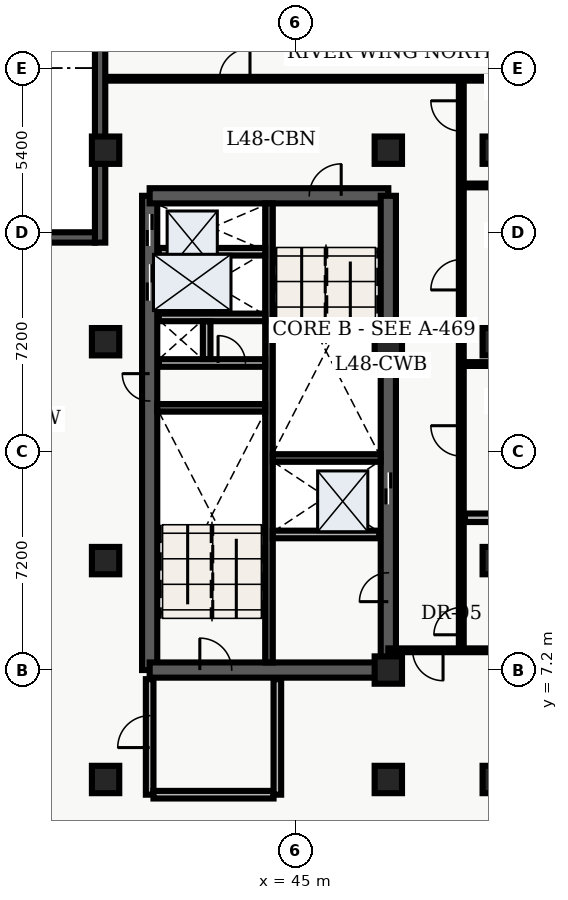
"""IFC4 building model, lengths in metres.
Left out: names, types, materials, properties, quantities, classifications, styles, units other than length and angle.
Written with IfcOpenShell. Run it as: python <this file> out.ifc"""

import sys

from ifc_helpers import new_model, entity, si_unit, converted_unit, direction, frame, origin_with_axes, origin_2d_with_axis, place, context, subcontext, project, spatial, polyline, rectangle, outline, extrude, element, fill, save


model = new_model("IFC4")
c1 = context("Model", 3, precision=1e-05, world=origin_with_axes(), true_north=direction((0.0, 1.0)))
c2 = subcontext(c1, "Body", "Model", "MODEL_VIEW")
j1 = project(units=[si_unit("LENGTHUNIT", "METRE"), converted_unit("PLANEANGLEUNIT", "DEGREE", entity("IfcPlaneAngleMeasure", 0.017), si_unit("PLANEANGLEUNIT", "RADIAN"), dimensions=[0, 0, 0, 0, 0, 0, 0])], contexts=[c1])
p1 = place(None, origin_with_axes())
s1 = spatial("IfcSite", under=j1, at=p1, CompositionType="ELEMENT")
p2 = place(p1, origin_with_axes())
s2 = spatial("IfcBuilding", under=s1, at=p2, CompositionType="ELEMENT")
p3 = place(p2, frame((0.0, 0.0, 196.5), z_axis=(0.0, 0.0, 1.0), x_axis=(1.0, 0.0, 0.0)))
s3 = spatial("IfcBuildingStorey", under=s2, at=p3, CompositionType="ELEMENT", Elevation=196.5)
p4 = place(p3, frame((40.2, 7.2, 0.0), z_axis=(0.0, 0.0, 1.0), x_axis=(0.0, 1.0, 0.0)))
e1 = element("IfcWall", 1, at=p4, inside=s3, PredefinedType="SHEAR", context=c2, shape_type="SweptSolid", body=[
    extrude(outline(polyline([(0.0, -0.25), (15.6, -0.25), (15.6, 0.25), (0.0, 0.25), (0.0, -0.25)])), origin_with_axes(), (0.0, 0.0, 1.0), 3.66),
])
p5 = place(p4, frame((14.475, 0.0, 0.0), z_axis=(0.0, 0.0, 1.0), x_axis=(1.0, 0.0, 0.0)))
e2 = element("IfcOpeningElement", 2, at=p5, cuts=e1, PredefinedType="OPENING", context=c2, shape_type="SweptSolid", body=[
    extrude(rectangle(XDim=1.05, YDim=0.52, at=origin_2d_with_axis()), origin_with_axes(), (0.0, 0.0, 1.0), 2.15),
])
p6 = place(p4, frame((12.75, 0.0, 0.0), z_axis=(0.0, 0.0, 1.0), x_axis=(1.0, 0.0, 0.0)))
e3 = element("IfcOpeningElement", 3, at=p6, cuts=e1, PredefinedType="OPENING", context=c2, shape_type="SweptSolid", body=[
    extrude(rectangle(XDim=1.2, YDim=0.52, at=origin_2d_with_axis()), origin_with_axes(), (0.0, 0.0, 1.0), 2.15),
])
p7 = place(p4, frame((9.3, 0.0, 0.0), z_axis=(0.0, 0.0, 1.0), x_axis=(1.0, 0.0, 0.0)))
e4 = element("IfcOpeningElement", 4, at=p7, cuts=e1, PredefinedType="OPENING", context=c2, shape_type="SweptSolid", body=[
    extrude(rectangle(XDim=0.9, YDim=0.52, at=origin_2d_with_axis()), origin_with_axes(), (0.0, 0.0, 1.0), 2.15),
])
p8 = place(p3, frame((40.2, 7.2, 0.0), z_axis=(0.0, 0.0, 1.0), x_axis=(1.0, 0.0, 0.0)))
e5 = element("IfcWall", 5, at=p8, inside=s3, PredefinedType="SHEAR", context=c2, shape_type="SweptSolid", body=[
    extrude(outline(polyline([(0.0, -0.25), (7.85, -0.25), (7.85, 0.25), (0.0, 0.25), (0.0, -0.25)])), origin_with_axes(), (0.0, 0.0, 1.0), 3.66),
])
p9 = place(p8, frame((2.175, 0.0, 0.0), z_axis=(0.0, 0.0, 1.0), x_axis=(1.0, 0.0, 0.0)))
e6 = element("IfcOpeningElement", 6, at=p9, cuts=e5, PredefinedType="OPENING", context=c2, shape_type="SweptSolid", body=[
    extrude(rectangle(XDim=1.05, YDim=0.52, at=origin_2d_with_axis()), origin_with_axes(), (0.0, 0.0, 1.0), 2.15),
])
p10 = place(p3, frame((40.2, 22.8, 0.0), z_axis=(0.0, 0.0, 1.0), x_axis=(1.0, 0.0, 0.0)))
e7 = element("IfcWall", 7, at=p10, inside=s3, PredefinedType="SHEAR", context=c2, shape_type="SweptSolid", body=[
    extrude(outline(polyline([(0.0, -0.25), (7.85, -0.25), (7.85, 0.25), (0.0, 0.25), (0.0, -0.25)])), origin_with_axes(), (0.0, 0.0, 1.0), 3.66),
])
p11 = place(p10, frame((5.775, 0.0, 0.0), z_axis=(0.0, 0.0, 1.0), x_axis=(1.0, 0.0, 0.0)))
e8 = element("IfcOpeningElement", 8, at=p11, cuts=e7, PredefinedType="OPENING", context=c2, shape_type="SweptSolid", body=[
    extrude(rectangle(XDim=1.05, YDim=0.52, at=origin_2d_with_axis()), origin_with_axes(), (0.0, 0.0, 1.0), 2.15),
])
p12 = place(p3, frame((48.05, 7.2, 0.0), z_axis=(0.0, 0.0, 1.0), x_axis=(0.0, 1.0, 0.0)))
e9 = element("IfcWall", 9, at=p12, inside=s3, PredefinedType="SHEAR", context=c2, shape_type="SweptSolid", body=[
    extrude(outline(polyline([(0.0, -0.25), (15.6, -0.25), (15.6, 0.25), (0.0, 0.25), (0.0, -0.25)])), origin_with_axes(), (0.0, 0.0, 1.0), 3.66),
])
p13 = place(p12, frame((5.975, 0.0, 0.0), z_axis=(0.0, 0.0, 1.0), x_axis=(1.0, 0.0, 0.0)))
e10 = element("IfcOpeningElement", 10, at=p13, cuts=e9, PredefinedType="OPENING", context=c2, shape_type="SweptSolid", body=[
    extrude(rectangle(XDim=1.05, YDim=0.52, at=origin_2d_with_axis()), origin_with_axes(), (0.0, 0.0, 1.0), 2.15),
])
p14 = place(p12, frame((2.725, 0.0, 0.0), z_axis=(0.0, 0.0, 1.0), x_axis=(1.0, 0.0, 0.0)))
e11 = element("IfcOpeningElement", 11, at=p14, cuts=e9, PredefinedType="OPENING", context=c2, shape_type="SweptSolid", body=[
    extrude(rectangle(XDim=0.95, YDim=0.52, at=origin_2d_with_axis()), origin_with_axes(), (0.0, 0.0, 1.0), 2.15),
])
p15 = place(p3, frame((44.125, 7.45, 0.0), z_axis=(0.0, 0.0, 1.0), x_axis=(0.0, 1.0, 0.0)))
e12 = element("IfcWall", 12, at=p15, inside=s3, PredefinedType="SHEAR", context=c2, shape_type="SweptSolid", body=[
    extrude(outline(polyline([(0.0, -0.125), (15.1, -0.125), (15.1, 0.125), (0.0, 0.125), (0.0, -0.125)])), origin_with_axes(), (0.0, 0.0, 1.0), 3.66),
])
for number, where, z_axis, x_axis in (
    (13, (40.45, 15.825, 0.0), (0.0, 0.0, 1.0), (1.0, 0.0, 0.0)),
    (14, (44.25, 14.175, 0.0), (0.0, 0.0, 1.0), (1.0, 0.0, 0.0)),
):
    element("IfcWall", number, at=place(p3, frame(where, z_axis=z_axis, x_axis=x_axis)), inside=s3, PredefinedType="SHEAR", context=c2, shape_type="SweptSolid", body=[
        extrude(outline(polyline([(0.0, -0.125), (3.55, -0.125), (3.55, 0.125), (0.0, 0.125), (0.0, -0.125)])), origin_with_axes(), (0.0, 0.0, 1.0), 3.66),
    ])
p16 = place(p3, frame((40.5, 17.3, 0.0), z_axis=(0.0, 0.0, 1.0), x_axis=(1.0, 0.0, 0.0)))
e15 = element("IfcWall", 15, at=p16, inside=s3, PredefinedType="SOLIDWALL", context=c2, shape_type="SweptSolid", body=[
    extrude(outline(polyline([(0.0, -0.125), (3.5, -0.125), (3.5, 0.125), (0.0, 0.125), (0.0, -0.125)])), origin_with_axes(), (0.0, 0.0, 1.0), 2.7),
])
p17 = place(p16, frame((2.4, 0.0, 0.0), z_axis=(0.0, 0.0, 1.0), x_axis=(1.0, 0.0, 0.0)))
e16 = element("IfcOpeningElement", 16, at=p17, cuts=e15, PredefinedType="OPENING", context=c2, shape_type="SweptSolid", body=[
    extrude(rectangle(XDim=0.9, YDim=0.27, at=origin_2d_with_axis()), origin_with_axes(), (0.0, 0.0, 1.0), 2.15),
])
p18 = place(p3, frame((40.5, 18.8, 0.0), z_axis=(0.0, 0.0, 1.0), x_axis=(1.0, 0.0, 0.0)))
e17 = element("IfcWall", 17, at=p18, inside=s3, PredefinedType="SOLIDWALL", context=c2, shape_type="SweptSolid", body=[
    extrude(outline(polyline([(0.0, -0.125), (3.5, -0.125), (3.5, 0.125), (0.0, 0.125), (0.0, -0.125)])), origin_with_axes(), (0.0, 0.0, 1.0), 2.7),
])
p19 = place(p3, frame((42.075, 17.43, 0.0), z_axis=(0.0, 0.0, 1.0), x_axis=(0.0, 1.0, 0.0)))
e18 = element("IfcWall", 18, at=p19, inside=s3, PredefinedType="SOLIDWALL", context=c2, shape_type="SweptSolid", body=[
    extrude(outline(polyline([(0.0, -0.125), (1.24, -0.125), (1.24, 0.125), (0.0, 0.125), (0.0, -0.125)])), origin_with_axes(), (0.0, 0.0, 1.0), 2.7),
])
p20 = place(p3, frame((40.2, 3.1, 0.0), z_axis=(0.0, 0.0, 1.0), x_axis=(0.0, 1.0, 0.0)))
e19 = element("IfcWall", 19, at=p20, inside=s3, PredefinedType="SOLIDWALL", context=c2, shape_type="SweptSolid", body=[
    extrude(outline(polyline([(0.0, -0.125), (3.8, -0.125), (3.8, 0.125), (0.0, 0.125), (0.0, -0.125)])), origin_with_axes(), (0.0, 0.0, 1.0), 2.7),
])
p21 = place(p20, frame((2.075, 0.0, 0.0), z_axis=(0.0, 0.0, 1.0), x_axis=(1.0, 0.0, 0.0)))
e20 = element("IfcOpeningElement", 20, at=p21, cuts=e19, PredefinedType="OPENING", context=c2, shape_type="SweptSolid", body=[
    extrude(rectangle(XDim=1.05, YDim=0.27, at=origin_2d_with_axis()), origin_with_axes(), (0.0, 0.0, 1.0), 2.15),
])
p22 = place(p3, frame((40.325, 3.1, 0.0), z_axis=(0.0, 0.0, 1.0), x_axis=(1.0, 0.0, 0.0)))
e21 = element("IfcWall", 21, at=p22, inside=s3, PredefinedType="SOLIDWALL", context=c2, shape_type="SweptSolid", body=[
    extrude(outline(polyline([(0.0, -0.125), (3.95, -0.125), (3.95, 0.125), (0.0, 0.125), (0.0, -0.125)])), origin_with_axes(), (0.0, 0.0, 1.0), 2.7),
])
p23 = place(p3, frame((44.4, 3.1, 0.0), z_axis=(0.0, 0.0, 1.0), x_axis=(0.0, 1.0, 0.0)))
e22 = element("IfcWall", 22, at=p23, inside=s3, PredefinedType="SOLIDWALL", context=c2, shape_type="SweptSolid", body=[
    extrude(outline(polyline([(0.0, -0.125), (3.8, -0.125), (3.8, 0.125), (0.0, 0.125), (0.0, -0.125)])), origin_with_axes(), (0.0, 0.0, 1.0), 2.7),
])
for number, where, z_axis, x_axis in (
    (23, (38.75, 3.6, 0.0), (0.0, 0.0, 1.0), (1.0, 0.0, 0.0)),
    (24, (38.75, 10.8, 0.0), (0.0, 0.0, 1.0), (1.0, 0.0, 0.0)),
    (25, (38.75, 18.0, 0.0), (0.0, 0.0, 1.0), (1.0, 0.0, 0.0)),
    (26, (38.75, 24.3, 0.0), (0.0, 0.0, 1.0), (1.0, 0.0, 0.0)),
    (27, (48.05, 3.6, 0.0), (0.0, 0.0, 1.0), (1.0, 0.0, 0.0)),
    (28, (48.05, 7.2, 0.0), (0.0, 0.0, 1.0), (1.0, 0.0, 0.0)),
    (29, (48.05, 18.0, 0.0), (0.0, 0.0, 1.0), (1.0, 0.0, 0.0)),
    (30, (48.05, 24.3, 0.0), (0.0, 0.0, 1.0), (1.0, 0.0, 0.0)),
    (31, (51.6, 3.6, 0.0), (0.0, 0.0, 1.0), (1.0, 0.0, 0.0)),
    (32, (51.6, 10.8, 0.0), (0.0, 0.0, 1.0), (1.0, 0.0, 0.0)),
    (33, (51.6, 18.0, 0.0), (0.0, 0.0, 1.0), (1.0, 0.0, 0.0)),
    (34, (51.6, 24.3, 0.0), (0.0, 0.0, 1.0), (1.0, 0.0, 0.0)),
):
    element("IfcColumn", number, at=place(p3, frame(where, z_axis=z_axis, x_axis=x_axis)), inside=s3, PredefinedType="COLUMN", context=c2, shape_type="SweptSolid", body=[
        extrude(rectangle(XDim=0.9, YDim=0.9, at=origin_2d_with_axis()), origin_with_axes(), (0.0, 0.0, 1.0), 3.9),
    ])
for number, where, z_axis, x_axis in (
    (35, (40.5, 20.96, 0.0), (0.0, 0.0, 1.0), (1.0, 0.0, 0.0)),
    (36, (44.25, 11.66, 0.0), (0.0, 0.0, 1.0), (1.0, 0.0, 0.0)),
):
    element("IfcWall", number, at=place(p3, frame(where, z_axis=z_axis, x_axis=x_axis)), inside=s3, PredefinedType="SOLIDWALL", context=c2, shape_type="SweptSolid", body=[
        extrude(outline(polyline([(0.0, -0.125), (3.5, -0.125), (3.5, 0.125), (0.0, 0.125), (0.0, -0.125)])), origin_with_axes(), (0.0, 0.0, 1.0), 2.7),
    ])
p24 = place(p3, frame((50.45, 7.85, 0.0), z_axis=(0.0, 0.0, 1.0), x_axis=(0.0, 1.0, 0.0)))
e37 = element("IfcWall", 37, at=p24, inside=s3, PredefinedType="PARTITIONING", context=c2, shape_type="SweptSolid", body=[
    extrude(outline(polyline([(0.0, -0.08), (18.8, -0.08), (18.8, 0.08), (0.0, 0.08), (0.0, -0.08)])), origin_with_axes(), (0.0, 0.0, 1.0), 2.7),
])
p25 = place(p24, frame((0.96, 0.0, 0.0), z_axis=(0.0, 0.0, 1.0), x_axis=(1.0, 0.0, 0.0)))
e38 = element("IfcOpeningElement", 38, at=p25, cuts=e37, PredefinedType="OPENING", context=c2, shape_type="SweptSolid", body=[
    extrude(rectangle(XDim=0.9, YDim=0.18, at=origin_2d_with_axis()), origin_with_axes(), (0.0, 0.0, 1.0), 2.15),
])
p26 = place(p24, frame((6.888, 0.0, 0.0), z_axis=(0.0, 0.0, 1.0), x_axis=(1.0, 0.0, 0.0)))
e39 = element("IfcOpeningElement", 39, at=p26, cuts=e37, PredefinedType="OPENING", context=c2, shape_type="SweptSolid", body=[
    extrude(rectangle(XDim=1.0, YDim=0.18, at=origin_2d_with_axis()), origin_with_axes(), (0.0, 0.0, 1.0), 2.15),
])
p27 = place(p24, frame((12.353, 0.0, 0.0), z_axis=(0.0, 0.0, 1.0), x_axis=(1.0, 0.0, 0.0)))
e40 = element("IfcOpeningElement", 40, at=p27, cuts=e37, PredefinedType="OPENING", context=c2, shape_type="SweptSolid", body=[
    extrude(rectangle(XDim=1.0, YDim=0.18, at=origin_2d_with_axis()), origin_with_axes(), (0.0, 0.0, 1.0), 2.15),
])
p28 = place(p24, frame((17.575, 0.0, 0.0), z_axis=(0.0, 0.0, 1.0), x_axis=(1.0, 0.0, 0.0)))
e41 = element("IfcOpeningElement", 41, at=p28, cuts=e37, PredefinedType="OPENING", context=c2, shape_type="SweptSolid", body=[
    extrude(rectangle(XDim=1.0, YDim=0.18, at=origin_2d_with_axis()), origin_with_axes(), (0.0, 0.0, 1.0), 2.15),
])
p29 = place(p3, frame((59.665, 7.85, 0.0), z_axis=(0.0, 0.0, 1.0), x_axis=(-1.0, 0.0, 0.0)))
e42 = element("IfcWall", 42, at=p29, inside=s3, PredefinedType="PARTITIONING", context=c2, shape_type="SweptSolid", body=[
    extrude(outline(polyline([(0.0, -0.062), (11.615, -0.062), (11.615, 0.062), (0.0, 0.062), (0.0, -0.062)])), origin_with_axes(), (0.0, 0.0, 1.0), 2.7),
])
p30 = place(p29, frame((10.315, 0.0, 0.0), z_axis=(0.0, 0.0, 1.0), x_axis=(1.0, 0.0, 0.0)))
e43 = element("IfcOpeningElement", 43, at=p30, cuts=e42, PredefinedType="OPENING", context=c2, shape_type="SweptSolid", body=[
    extrude(rectangle(XDim=1.0, YDim=0.145, at=origin_2d_with_axis()), origin_with_axes(), (0.0, 0.0, 1.0), 2.15),
])
p31 = place(p3, frame((38.735, 26.65, 0.0), z_axis=(0.0, 0.0, 1.0), x_axis=(1.0, 0.0, 0.0)))
e44 = element("IfcWall", 44, at=p31, inside=s3, PredefinedType="PARTITIONING", context=c2, shape_type="SweptSolid", body=[
    extrude(outline(polyline([(0.0, -0.062), (20.905, -0.062), (20.905, 0.062), (0.0, 0.062), (0.0, -0.062)])), origin_with_axes(), (0.0, 0.0, 1.0), 2.7),
])
p32 = place(p31, frame((4.265, 0.0, 0.0), z_axis=(0.0, 0.0, 1.0), x_axis=(1.0, 0.0, 0.0)))
e45 = element("IfcOpeningElement", 45, at=p32, cuts=e44, PredefinedType="OPENING", context=c2, shape_type="SweptSolid", body=[
    extrude(rectangle(XDim=1.0, YDim=0.145, at=origin_2d_with_axis()), origin_with_axes(), (0.0, 0.0, 1.0), 2.15),
])
p33 = place(p3, frame((50.57, 12.209, 0.0), z_axis=(0.0, 0.0, 1.0), x_axis=(1.0, 0.0, 0.0)))
e46 = element("IfcWall", 46, at=p33, inside=s3, PredefinedType="PARTITIONING", context=c2, shape_type="SweptSolid", body=[
    extrude(outline(polyline([(0.0, -0.14), (9.095, -0.14), (9.095, 0.14), (0.0, 0.14), (0.0, -0.14)])), origin_with_axes(), (0.0, 0.0, 1.0), 2.7),
])
for number, where, z_axis, x_axis in (
    (47, (50.57, 17.266, 0.0), (0.0, 0.0, 1.0), (1.0, 0.0, 0.0)),
    (48, (50.57, 23.14, 0.0), (0.0, 0.0, 1.0), (1.0, 0.0, 0.0)),
):
    element("IfcWall", number, at=place(p3, frame(where, z_axis=z_axis, x_axis=x_axis)), inside=s3, PredefinedType="PARTITIONING", context=c2, shape_type="SweptSolid", body=[
        extrude(outline(polyline([(0.0, -0.062), (9.095, -0.062), (9.095, 0.062), (0.0, 0.062), (0.0, -0.062)])), origin_with_axes(), (0.0, 0.0, 1.0), 2.7),
    ])
p34 = place(p3, frame((38.57, 21.26, 0.0), z_axis=(0.0, 0.0, 1.0), x_axis=(0.0, 1.0, 0.0)))
e49 = element("IfcWall", 49, at=p34, inside=s3, PredefinedType="SOLIDWALL", context=c2, shape_type="SweptSolid", body=[
    extrude(outline(polyline([(0.0, -0.17), (7.54, -0.17), (7.54, 0.17), (0.0, 0.17), (0.0, -0.17)])), origin_with_axes(), (0.0, 0.0, 1.0), 3.66),
])
p35 = place(p3, frame((28.039, 21.43, 0.0), z_axis=(0.0, 0.0, 1.0), x_axis=(1.0, 0.0, 0.0)))
e50 = element("IfcWall", 50, at=p35, inside=s3, PredefinedType="SOLIDWALL", context=c2, shape_type="SweptSolid", body=[
    extrude(outline(polyline([(0.0, -0.17), (10.361, -0.17), (10.361, 0.17), (0.0, 0.17), (0.0, -0.17)])), origin_with_axes(), (0.0, 0.0, 1.0), 3.66),
])
p36 = place(p35, frame((2.89, 0.0, 0.45), z_axis=(0.0, 0.0, 1.0), x_axis=(1.0, 0.0, 0.0)))
e51 = element("IfcOpeningElement", 51, at=p36, cuts=e50, PredefinedType="OPENING", context=c2, shape_type="SweptSolid", body=[
    extrude(rectangle(XDim=1.8, YDim=0.36, at=origin_2d_with_axis()), origin_with_axes(), (0.0, 0.0, 1.0), 2.1),
])
p37 = place(p35, frame((6.621, 0.0, 0.45), z_axis=(0.0, 0.0, 1.0), x_axis=(1.0, 0.0, 0.0)))
e52 = element("IfcOpeningElement", 52, at=p37, cuts=e50, PredefinedType="OPENING", context=c2, shape_type="SweptSolid", body=[
    extrude(rectangle(XDim=1.8, YDim=0.36, at=origin_2d_with_axis()), origin_with_axes(), (0.0, 0.0, 1.0), 2.1),
])
p38 = place(p12, frame((5.975, 0.0, 0.0), z_axis=(0.0, 0.0, 1.0), x_axis=(1.0, 0.0, 0.0)))
e53 = element("IfcDoor", 53, at=p38, inside=s3, OperationType="SLIDING_TO_LEFT", PredefinedType="DOOR", context=c2, shape_type="SweptSolid", body=[
    extrude(rectangle(XDim=1.05, YDim=0.09, at=origin_2d_with_axis()), origin_with_axes(), (0.0, 0.0, 1.0), 2.15),
])
fill(e10, e53)
p39 = place(p4, frame((14.475, 0.0, 0.0), z_axis=(0.0, 0.0, 1.0), x_axis=(1.0, 0.0, 0.0)))
e54 = element("IfcDoor", 54, at=p39, inside=s3, OperationType="SLIDING_TO_RIGHT", PredefinedType="DOOR", context=c2, shape_type="SweptSolid", body=[
    extrude(rectangle(XDim=1.05, YDim=0.09, at=origin_2d_with_axis()), origin_with_axes(), (0.0, 0.0, 1.0), 2.15),
])
fill(e2, e54)
p40 = place(p4, frame((12.75, 0.0, 0.0), z_axis=(0.0, 0.0, 1.0), x_axis=(1.0, 0.0, 0.0)))
e55 = element("IfcDoor", 55, at=p40, inside=s3, OperationType="DOUBLE_DOOR_SLIDING", PredefinedType="DOOR", context=c2, shape_type="SweptSolid", body=[
    extrude(rectangle(XDim=1.2, YDim=0.09, at=origin_2d_with_axis()), origin_with_axes(), (0.0, 0.0, 1.0), 2.15),
])
fill(e3, e55)
p41 = place(p4, frame((9.3, 0.0, 0.0), z_axis=(0.0, 0.0, 1.0), x_axis=(1.0, 0.0, 0.0)))
e56 = element("IfcDoor", 56, at=p41, inside=s3, OperationType="SINGLE_SWING_RIGHT", PredefinedType="DOOR", context=c2, shape_type="SweptSolid", body=[
    extrude(rectangle(XDim=0.9, YDim=0.09, at=origin_2d_with_axis()), origin_with_axes(), (0.0, 0.0, 1.0), 2.15),
])
fill(e4, e56)
p42 = place(p16, frame((2.4, 0.0, 0.0), z_axis=(0.0, 0.0, 1.0), x_axis=(1.0, 0.0, 0.0)))
e57 = element("IfcDoor", 57, at=p42, inside=s3, OperationType="SINGLE_SWING_LEFT", PredefinedType="DOOR", context=c2, shape_type="SweptSolid", body=[
    extrude(rectangle(XDim=0.9, YDim=0.09, at=origin_2d_with_axis()), origin_with_axes(), (0.0, 0.0, 1.0), 2.15),
])
fill(e16, e57)
p43 = place(p8, frame((2.175, 0.0, 0.0), z_axis=(0.0, 0.0, 1.0), x_axis=(1.0, 0.0, 0.0)))
e58 = element("IfcDoor", 58, at=p43, inside=s3, OperationType="SINGLE_SWING_LEFT", PredefinedType="DOOR", context=c2, shape_type="SweptSolid", body=[
    extrude(rectangle(XDim=1.05, YDim=0.09, at=origin_2d_with_axis()), origin_with_axes(), (0.0, 0.0, 1.0), 2.15),
])
fill(e6, e58)
p44 = place(p10, frame((5.775, 0.0, 0.0), z_axis=(0.0, 0.0, 1.0), x_axis=(1.0, 0.0, 0.0)))
e59 = element("IfcDoor", 59, at=p44, inside=s3, OperationType="SINGLE_SWING_RIGHT", PredefinedType="DOOR", context=c2, shape_type="SweptSolid", body=[
    extrude(rectangle(XDim=1.05, YDim=0.09, at=origin_2d_with_axis()), origin_with_axes(), (0.0, 0.0, 1.0), 2.15),
])
fill(e8, e59)
p45 = place(p20, frame((2.075, 0.0, 0.0), z_axis=(0.0, 0.0, 1.0), x_axis=(1.0, 0.0, 0.0)))
e60 = element("IfcDoor", 60, at=p45, inside=s3, OperationType="SINGLE_SWING_LEFT", PredefinedType="DOOR", context=c2, shape_type="SweptSolid", body=[
    extrude(rectangle(XDim=1.05, YDim=0.09, at=origin_2d_with_axis()), origin_with_axes(), (0.0, 0.0, 1.0), 2.15),
])
fill(e20, e60)
p46 = place(p12, frame((2.725, 0.0, 0.0), z_axis=(0.0, 0.0, 1.0), x_axis=(1.0, 0.0, 0.0)))
e61 = element("IfcDoor", 61, at=p46, inside=s3, OperationType="SINGLE_SWING_LEFT", PredefinedType="DOOR", context=c2, shape_type="SweptSolid", body=[
    extrude(rectangle(XDim=0.95, YDim=0.09, at=origin_2d_with_axis()), origin_with_axes(), (0.0, 0.0, 1.0), 2.15),
])
fill(e11, e61)
p47 = place(p29, frame((10.315, 0.0, 0.0), z_axis=(0.0, 0.0, 1.0), x_axis=(1.0, 0.0, 0.0)))
e62 = element("IfcDoor", 62, at=p47, inside=s3, OperationType="SINGLE_SWING_LEFT", PredefinedType="DOOR", context=c2, shape_type="SweptSolid", body=[
    extrude(rectangle(XDim=1.0, YDim=0.075, at=origin_2d_with_axis()), origin_with_axes(), (0.0, 0.0, 1.0), 2.15),
])
fill(e43, e62)
p48 = place(p31, frame((4.265, 0.0, 0.0), z_axis=(0.0, 0.0, 1.0), x_axis=(1.0, 0.0, 0.0)))
e63 = element("IfcDoor", 63, at=p48, inside=s3, OperationType="SINGLE_SWING_RIGHT", PredefinedType="DOOR", context=c2, shape_type="SweptSolid", body=[
    extrude(rectangle(XDim=1.0, YDim=0.075, at=origin_2d_with_axis()), origin_with_axes(), (0.0, 0.0, 1.0), 2.15),
])
fill(e45, e63)
p49 = place(p24, frame((0.96, 0.0, 0.0), z_axis=(0.0, 0.0, 1.0), x_axis=(1.0, 0.0, 0.0)))
e64 = element("IfcDoor", 64, at=p49, inside=s3, OperationType="SINGLE_SWING_LEFT", PredefinedType="DOOR", context=c2, shape_type="SweptSolid", body=[
    extrude(rectangle(XDim=0.9, YDim=0.09, at=origin_2d_with_axis()), origin_with_axes(), (0.0, 0.0, 1.0), 2.15),
])
fill(e38, e64)
p50 = place(p24, frame((6.888, 0.0, 0.0), z_axis=(0.0, 0.0, 1.0), x_axis=(1.0, 0.0, 0.0)))
e65 = element("IfcDoor", 65, at=p50, inside=s3, OperationType="SINGLE_SWING_RIGHT", PredefinedType="DOOR", context=c2, shape_type="SweptSolid", body=[
    extrude(rectangle(XDim=1.0, YDim=0.09, at=origin_2d_with_axis()), origin_with_axes(), (0.0, 0.0, 1.0), 2.15),
])
fill(e39, e65)
p51 = place(p24, frame((12.353, 0.0, 0.0), z_axis=(0.0, 0.0, 1.0), x_axis=(1.0, 0.0, 0.0)))
e66 = element("IfcDoor", 66, at=p51, inside=s3, OperationType="SINGLE_SWING_LEFT", PredefinedType="DOOR", context=c2, shape_type="SweptSolid", body=[
    extrude(rectangle(XDim=1.0, YDim=0.09, at=origin_2d_with_axis()), origin_with_axes(), (0.0, 0.0, 1.0), 2.15),
])
fill(e40, e66)
p52 = place(p24, frame((17.575, 0.0, 0.0), z_axis=(0.0, 0.0, 1.0), x_axis=(1.0, 0.0, 0.0)))
e67 = element("IfcDoor", 67, at=p52, inside=s3, OperationType="SINGLE_SWING_RIGHT", PredefinedType="DOOR", context=c2, shape_type="SweptSolid", body=[
    extrude(rectangle(XDim=1.0, YDim=0.09, at=origin_2d_with_axis()), origin_with_axes(), (0.0, 0.0, 1.0), 2.15),
])
fill(e41, e67)
save(model, sys.argv[1])
